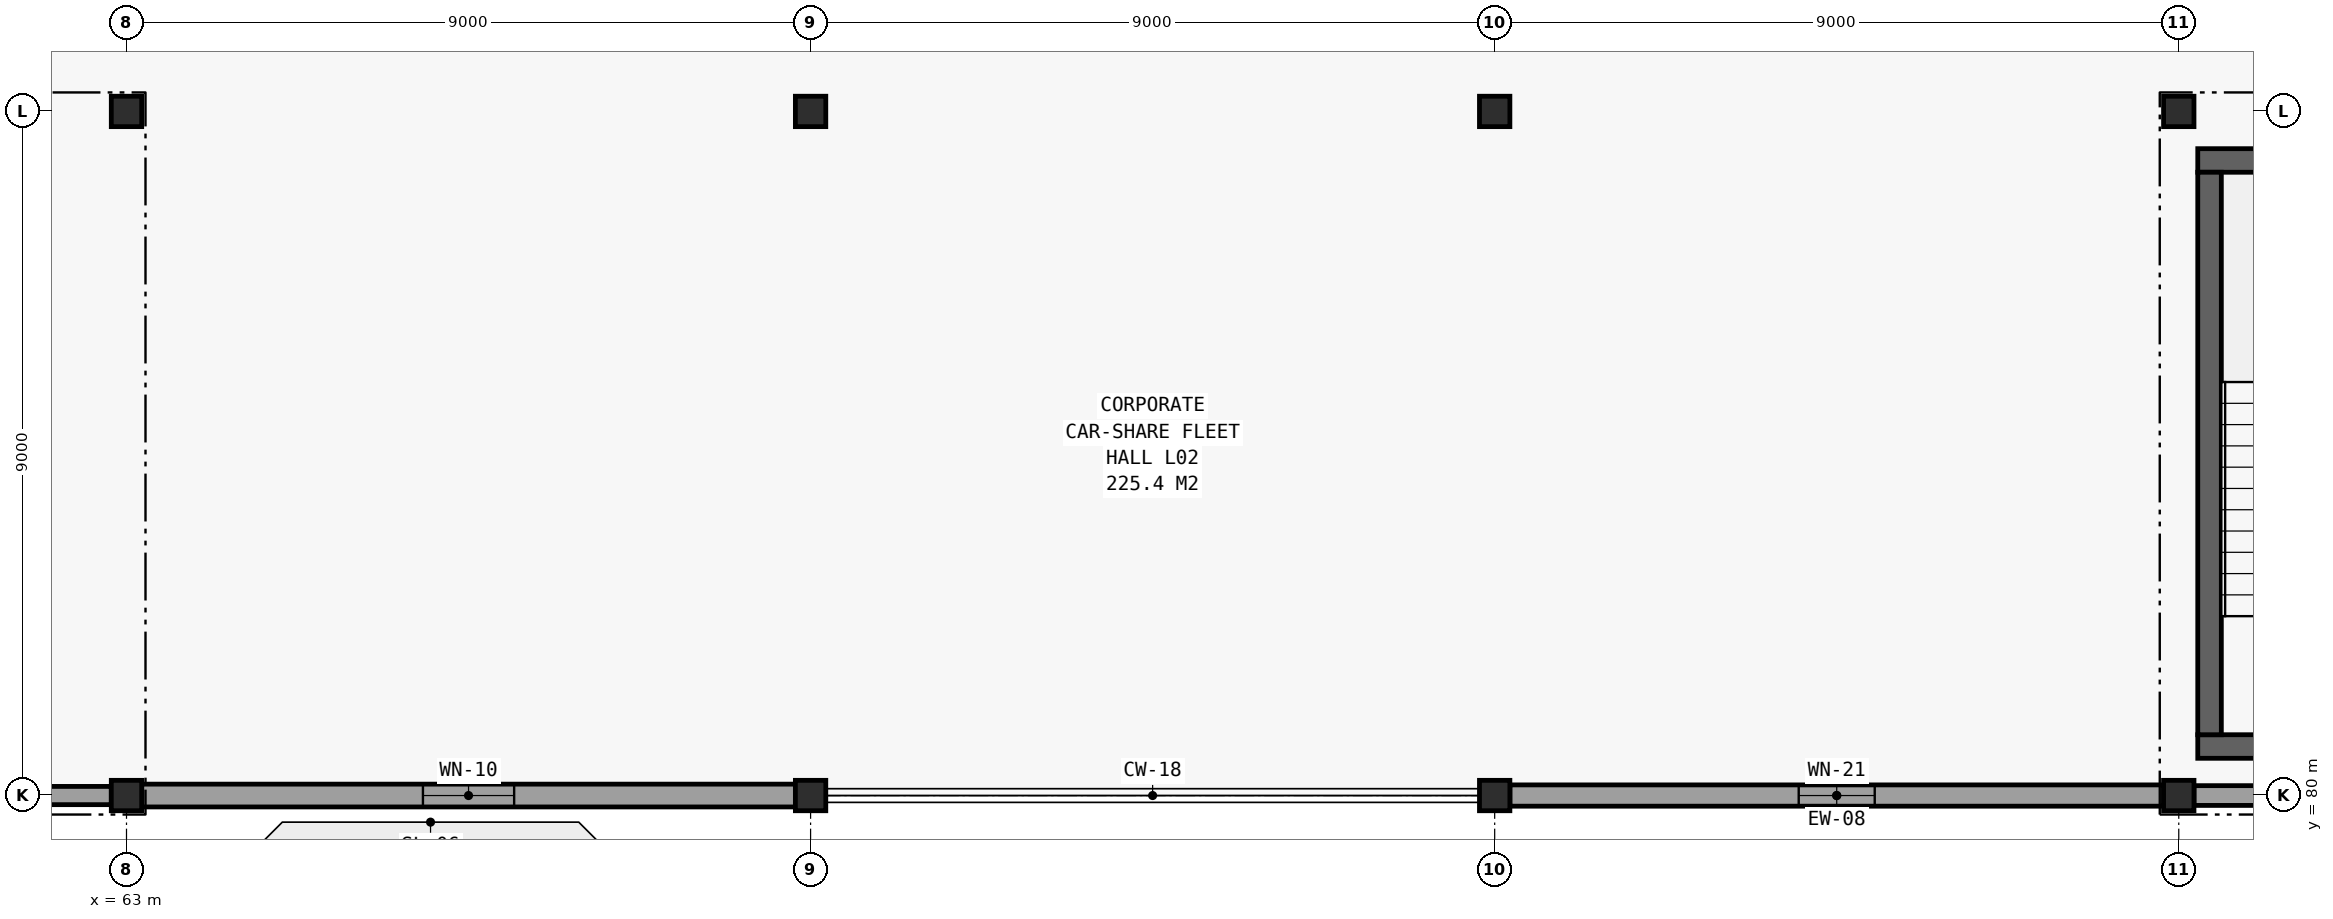
"""IFC4 building model, lengths in metres.
Left out: names, types, materials, properties, quantities, classifications, styles, units other than length and angle.
Written with IfcOpenShell. Run it as: python <this file> out.ifc"""

import sys

from ifc_helpers import new_model, si_unit, direction, frame, frame_2d, origin, origin_2d, place, context, subcontext, project, spatial, rectangle, hollow_rectangle, extrude, element, fill, save


model = new_model("IFC4")
c1 = context("Model", 3, precision=1e-05, world=origin(), true_north=direction((0.0, 1.0)))
c2 = subcontext(c1, "Body", "Model", "MODEL_VIEW")
j1 = project(units=[si_unit("LENGTHUNIT", "METRE"), si_unit("PLANEANGLEUNIT", "RADIAN")], contexts=[c1])
p1 = place(None, origin())
s1 = spatial("IfcSite", under=j1, at=p1, CompositionType="ELEMENT")
p2 = place(p1, origin())
s2 = spatial("IfcBuilding", under=s1, at=p2, CompositionType="ELEMENT")
p3 = place(p2, frame((0.0, 0.0, 9.3)))
s3 = spatial("IfcBuildingStorey", under=s2, at=p3, CompositionType="ELEMENT", Elevation=9.3)
for number, where, z_axis, x_axis in (
    (1, (63.0, 80.0, 0.0), (0.0, 0.0, 1.0), (1.0, 0.0, 0.0)),
    (2, (63.0, 89.0, 0.0), (0.0, 0.0, 1.0), (1.0, 0.0, 0.0)),
    (3, (72.0, 80.0, 0.0), (0.0, 0.0, 1.0), (1.0, 0.0, 0.0)),
    (4, (72.0, 89.0, 0.0), (0.0, 0.0, 1.0), (1.0, 0.0, 0.0)),
    (5, (81.0, 80.0, 0.0), (0.0, 0.0, 1.0), (1.0, 0.0, 0.0)),
    (6, (81.0, 89.0, 0.0), (0.0, 0.0, 1.0), (1.0, 0.0, 0.0)),
    (7, (90.0, 80.0, 0.0), (0.0, 0.0, 1.0), (1.0, 0.0, 0.0)),
    (8, (90.0, 89.0, 0.0), (0.0, 0.0, 1.0), (1.0, 0.0, 0.0)),
):
    element("IfcColumn", number, at=place(p3, frame(where, z_axis=z_axis, x_axis=x_axis)), inside=s3, PredefinedType="COLUMN", context=c2, shape_type="SweptSolid", body=[
        extrude(hollow_rectangle(XDim=0.4, YDim=0.4, WallThickness=0.019, at=origin_2d()), origin(), (0.0, 0.0, 1.0), 4.2),
    ])
p4 = place(p3, frame((54.1, 80.0, 0.0), z_axis=(0.0, 0.0, 1.0), x_axis=(1.0, 0.0, 0.0)))
e9 = element("IfcWall", 9, at=p4, inside=s3, PredefinedType="SOLIDWALL", context=c2, shape_type="SweptSolid", body=[
    extrude(rectangle(XDim=8.7, YDim=0.24, at=frame_2d((4.35, 0.0))), origin(), (0.0, 0.0, 1.0), 3.25),
])
p5 = place(p4, frame((3.65, 0.0, 0.95)))
e10 = element("IfcOpeningElement", 10, at=p5, cuts=e9, PredefinedType="OPENING", context=c2, shape_type="SweptSolid", body=[
    extrude(rectangle(XDim=1.4, YDim=2.0, at=frame_2d((0.7, 1.0))), frame((0.0, 0.131, 0.0), z_axis=(0.0, -1.0, 0.0), x_axis=(1.0, 0.0, 0.0)), (0.0, 0.0, 1.0), 0.262),
])
p6 = place(p3, frame((63.2, 80.0, 0.0), z_axis=(0.0, 0.0, 1.0), x_axis=(1.0, 0.0, 0.0)))
e11 = element("IfcWall", 11, at=p6, inside=s3, PredefinedType="SOLIDWALL", context=c2, shape_type="SweptSolid", body=[
    extrude(rectangle(XDim=8.6, YDim=0.3, at=frame_2d((4.3, 0.0))), origin(), (0.0, 0.0, 1.0), 3.25),
])
p7 = place(p6, frame((3.7, 0.0, 0.95)))
e12 = element("IfcOpeningElement", 12, at=p7, cuts=e11, PredefinedType="OPENING", context=c2, shape_type="SweptSolid", body=[
    extrude(rectangle(XDim=1.2, YDim=1.8, at=frame_2d((0.6, 0.9))), frame((0.0, 0.161, 0.0), z_axis=(0.0, -1.0, 0.0), x_axis=(1.0, 0.0, 0.0)), (0.0, 0.0, 1.0), 0.322),
])
p8 = place(p3, frame((81.2, 80.0, 0.0), z_axis=(0.0, 0.0, 1.0), x_axis=(1.0, 0.0, 0.0)))
e13 = element("IfcWall", 13, at=p8, inside=s3, PredefinedType="SOLIDWALL", context=c2, shape_type="SweptSolid", body=[
    extrude(rectangle(XDim=8.6, YDim=0.28, at=frame_2d((4.3, 0.0))), origin(), (0.0, 0.0, 1.0), 3.25),
])
p9 = place(p8, frame((3.8, 0.0, 0.95)))
e14 = element("IfcOpeningElement", 14, at=p9, cuts=e13, PredefinedType="OPENING", context=c2, shape_type="SweptSolid", body=[
    extrude(rectangle(XDim=1.0, YDim=1.4, at=frame_2d((0.5, 0.7))), frame((0.0, 0.151, 0.0), z_axis=(0.0, -1.0, 0.0), x_axis=(1.0, 0.0, 0.0)), (0.0, 0.0, 1.0), 0.302),
])
p10 = place(p3, frame((90.2, 80.0, 0.0), z_axis=(0.0, 0.0, 1.0), x_axis=(1.0, 0.0, 0.0)))
e15 = element("IfcWall", 15, at=p10, inside=s3, PredefinedType="SOLIDWALL", context=c2, shape_type="SweptSolid", body=[
    extrude(rectangle(XDim=8.6, YDim=0.26, at=frame_2d((4.3, 0.0))), origin(), (0.0, 0.0, 1.0), 3.25),
])
p11 = place(p10, frame((3.85, 0.0, 0.95)))
e16 = element("IfcOpeningElement", 16, at=p11, cuts=e15, PredefinedType="OPENING", context=c2, shape_type="SweptSolid", body=[
    extrude(rectangle(XDim=0.9, YDim=1.3, at=frame_2d((0.45, 0.65))), frame((0.0, 0.141, 0.0), z_axis=(0.0, -1.0, 0.0), x_axis=(1.0, 0.0, 0.0)), (0.0, 0.0, 1.0), 0.282),
])
for number, where, z_axis, x_axis in (
    (17, (90.25, 80.645, 0.0), (0.0, 0.0, 1.0), (1.0, 0.0, 0.0)),
    (18, (90.25, 88.355, 0.0), (0.0, 0.0, 1.0), (1.0, 0.0, 0.0)),
):
    element("IfcWall", number, at=place(p3, frame(where, z_axis=z_axis, x_axis=x_axis)), inside=s3, PredefinedType="SHEAR", context=c2, shape_type="SweptSolid", body=[
        extrude(rectangle(XDim=3.9, YDim=0.31, at=frame_2d((1.95, 0.0))), origin(), (0.0, 0.0, 1.0), 3.95),
    ])
p12 = place(p3, frame((90.405, 80.8, 0.0), z_axis=(0.0, 0.0, 1.0), x_axis=(0.0, 1.0, 0.0)))
e19 = element("IfcWall", 19, at=p12, inside=s3, PredefinedType="SHEAR", context=c2, shape_type="SweptSolid", body=[
    extrude(rectangle(XDim=7.4, YDim=0.31, at=frame_2d((3.7, 0.0))), origin(), (0.0, 0.0, 1.0), 3.95),
])
p13 = place(p7, origin())
e20 = element("IfcWindow", 20, at=p13, inside=s3, PartitioningType="SINGLE_PANEL", PredefinedType="WINDOW", context=c2, shape_type="SweptSolid", body=[
    extrude(rectangle(XDim=1.2, YDim=1.8, at=frame_2d((0.6, 0.9))), frame((0.0, 0.03, 0.0), z_axis=(0.0, -1.0, 0.0), x_axis=(1.0, 0.0, 0.0)), (0.0, 0.0, 1.0), 0.06),
])
fill(e12, e20)
p14 = place(p9, origin())
e21 = element("IfcWindow", 21, at=p14, inside=s3, PartitioningType="SINGLE_PANEL", PredefinedType="WINDOW", context=c2, shape_type="SweptSolid", body=[
    extrude(rectangle(XDim=1.0, YDim=1.4, at=frame_2d((0.5, 0.7))), frame((0.0, 0.03, 0.0), z_axis=(0.0, -1.0, 0.0), x_axis=(1.0, 0.0, 0.0)), (0.0, 0.0, 1.0), 0.06),
])
fill(e14, e21)
save(model, sys.argv[1])
